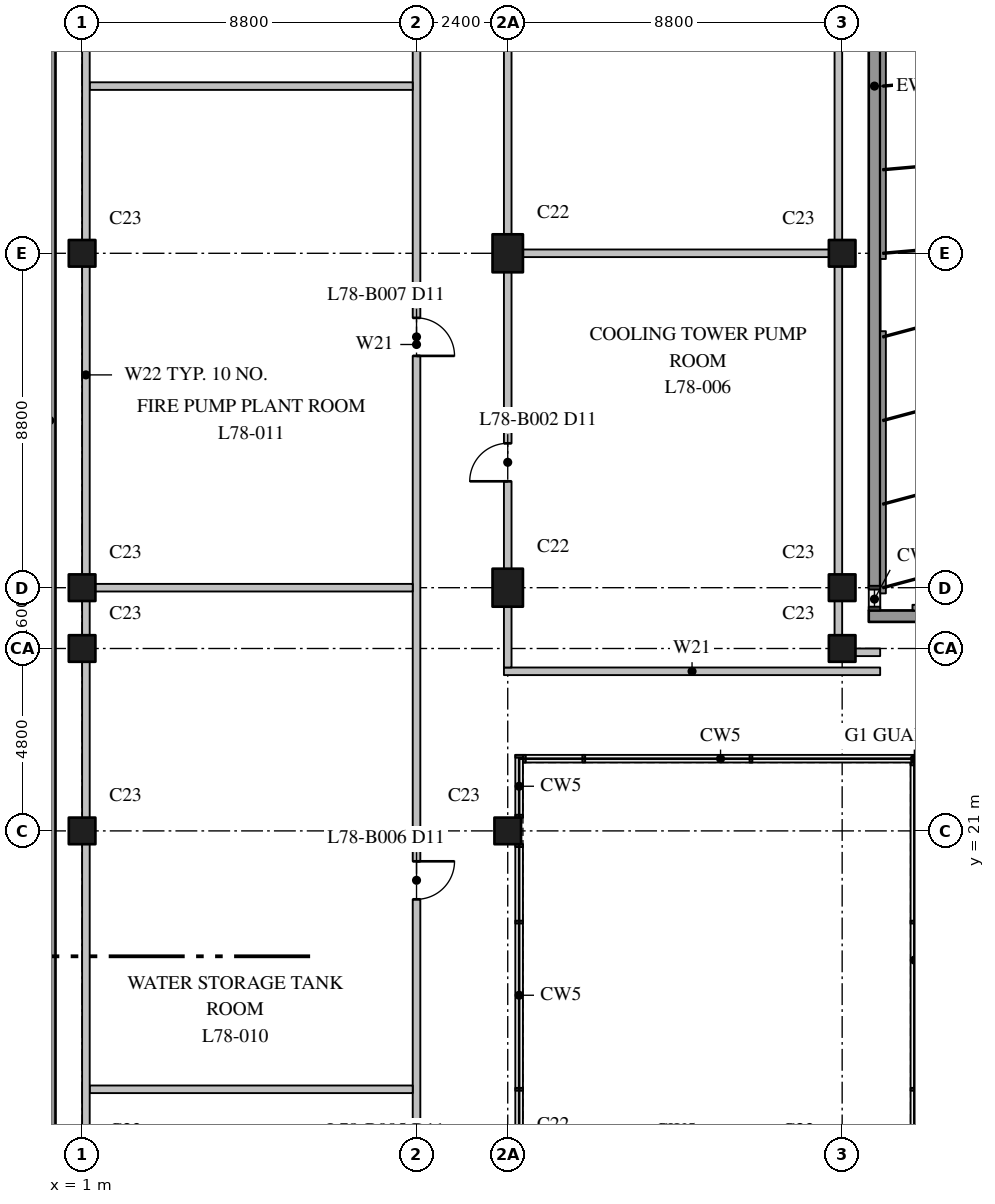
"""IFC4 building model, lengths in metres.
Left out: names, types, materials, properties, quantities, classifications, styles, units other than length and angle.
Written with IfcOpenShell. Run it as: python <this file> out.ifc"""

import sys

from ifc_helpers import new_model, si_unit, direction, frame, frame_2d, origin, origin_2d, place, context, subcontext, project, spatial, rectangle, extrude, element, fill, save


model = new_model("IFC4")
c1 = context("Model", 3, precision=1e-05, world=origin(), true_north=direction((0.0, 1.0)))
c2 = subcontext(c1, "Body", "Model", "MODEL_VIEW")
j1 = project(units=[si_unit("LENGTHUNIT", "METRE"), si_unit("PLANEANGLEUNIT", "RADIAN")], contexts=[c1])
p1 = place(None, origin())
s1 = spatial("IfcSite", under=j1, at=p1, CompositionType="ELEMENT")
p2 = place(p1, origin())
s2 = spatial("IfcBuilding", under=s1, at=p2, CompositionType="ELEMENT")
p3 = place(p2, frame((0.0, 0.0, 309.2)))
s3 = spatial("IfcBuildingStorey", under=s2, at=p3, CompositionType="ELEMENT", Elevation=309.2)
for number, where, z_axis, x_axis in (
    (1, (1.0, 21.0, 0.0), (0.0, 0.0, 1.0), (1.0, 0.0, 0.0)),
    (2, (1.0, 25.8, 0.0), (0.0, 0.0, 1.0), (1.0, 0.0, 0.0)),
    (3, (1.0, 27.4, 0.0), (0.0, 0.0, 1.0), (1.0, 0.0, 0.0)),
    (4, (1.0, 36.2, 0.0), (0.0, 0.0, 1.0), (1.0, 0.0, 0.0)),
    (5, (12.2, 21.0, 0.0), (0.0, 0.0, 1.0), (1.0, 0.0, 0.0)),
):
    element("IfcColumn", number, at=place(p3, frame(where, z_axis=z_axis, x_axis=x_axis)), inside=s3, PredefinedType="COLUMN", context=c2, shape_type="SweptSolid", body=[
        extrude(rectangle(XDim=0.7, YDim=0.7, at=origin_2d()), origin(), (0.0, 0.0, 1.0), 5.0),
    ])
for number, where, z_axis, x_axis in (
    (6, (12.2, 27.4, 0.0), (0.0, 0.0, 1.0), (0.0, 1.0, 0.0)),
    (7, (12.2, 36.2, 0.0), (0.0, 0.0, 1.0), (0.0, 1.0, 0.0)),
):
    element("IfcColumn", number, at=place(p3, frame(where, z_axis=z_axis, x_axis=x_axis)), inside=s3, PredefinedType="COLUMN", context=c2, shape_type="SweptSolid", body=[
        extrude(rectangle(XDim=1.0, YDim=0.8, at=origin_2d()), origin(), (0.0, 0.0, 1.0), 5.0),
    ])
for number, where, z_axis, x_axis in (
    (8, (21.0, 25.8, 0.0), (0.0, 0.0, 1.0), (1.0, 0.0, 0.0)),
    (9, (21.0, 27.4, 0.0), (0.0, 0.0, 1.0), (1.0, 0.0, 0.0)),
    (10, (21.0, 36.2, 0.0), (0.0, 0.0, 1.0), (1.0, 0.0, 0.0)),
):
    element("IfcColumn", number, at=place(p3, frame(where, z_axis=z_axis, x_axis=x_axis)), inside=s3, PredefinedType="COLUMN", context=c2, shape_type="SweptSolid", body=[
        extrude(rectangle(XDim=0.7, YDim=0.7, at=origin_2d()), origin(), (0.0, 0.0, 1.0), 5.0),
    ])
p4 = place(p3, frame((0.15, 53.8, 0.0), z_axis=(0.0, 0.0, 1.0), x_axis=(0.0, -1.0, 0.0)))
e11 = element("IfcWall", 11, at=p4, inside=s3, PredefinedType="STANDARD", context=c2, shape_type="SweptSolid", body=[
    extrude(rectangle(XDim=44.0, YDim=0.3, at=frame_2d((22.0, 0.0))), origin(), (0.0, 0.0, 1.0), 4.7),
])
p5 = place(p3, frame((26.5, 26.65, 0.0), z_axis=(0.0, 0.0, 1.0), x_axis=(-1.0, 0.0, 0.0)))
e12 = element("IfcWall", 12, at=p5, inside=s3, PredefinedType="STANDARD", context=c2, shape_type="SweptSolid", body=[
    extrude(rectangle(XDim=4.8, YDim=0.3, at=frame_2d((2.4, 0.0))), origin(), (0.0, 0.0, 1.0), 4.7),
])
p6 = place(p3, frame((21.85, 27.4, 0.0), z_axis=(0.0, 0.0, 1.0), x_axis=(0.0, 1.0, 0.0)))
e13 = element("IfcWall", 13, at=p6, inside=s3, PredefinedType="STANDARD", context=c2, shape_type="SweptSolid", body=[
    extrude(rectangle(XDim=26.4, YDim=0.3, at=frame_2d((13.2, 0.0))), origin(), (0.0, 0.0, 1.0), 4.7),
])
p7 = place(p3, frame((12.1, 25.2, 0.0), z_axis=(0.0, 0.0, 1.0), x_axis=(1.0, 0.0, 0.0)))
e14 = element("IfcWall", 14, at=p7, inside=s3, PredefinedType="PARTITIONING", context=c2, shape_type="SweptSolid", body=[
    extrude(rectangle(XDim=9.9, YDim=0.2, at=frame_2d((4.95, 0.0))), origin(), (0.0, 0.0, 1.0), 4.7),
])
for number, where, z_axis, x_axis in (
    (15, (12.3, 36.2, 0.0), (0.0, 0.0, 1.0), (1.0, 0.0, 0.0)),
    (16, (1.2, 14.2, 0.0), (0.0, 0.0, 1.0), (1.0, 0.0, 0.0)),
    (17, (1.2, 27.4, 0.0), (0.0, 0.0, 1.0), (1.0, 0.0, 0.0)),
    (18, (1.2, 40.6, 0.0), (0.0, 0.0, 1.0), (1.0, 0.0, 0.0)),
):
    element("IfcWall", number, at=place(p3, frame(where, z_axis=z_axis, x_axis=x_axis)), inside=s3, PredefinedType="PARTITIONING", context=c2, shape_type="SweptSolid", body=[
        extrude(rectangle(XDim=8.5, YDim=0.2, at=frame_2d((4.25, 0.0))), origin(), (0.0, 0.0, 1.0), 4.7),
    ])
p8 = place(p3, frame((20.8, 25.7, 0.0), z_axis=(0.0, 0.0, 1.0), x_axis=(1.0, 0.0, 0.0)))
e19 = element("IfcWall", 19, at=p8, inside=s3, PredefinedType="PARTITIONING", context=c2, shape_type="SweptSolid", body=[
    extrude(rectangle(XDim=1.2, YDim=0.2, at=frame_2d((0.6, 0.0))), origin(), (0.0, 0.0, 1.0), 4.7),
])
p9 = place(p3, frame((9.8, 9.8, 0.0), z_axis=(0.0, 0.0, 1.0), x_axis=(0.0, 1.0, 0.0)))
e20 = element("IfcWall", 20, at=p9, inside=s3, PredefinedType="PARTITIONING", context=c2, shape_type="SweptSolid", body=[
    extrude(rectangle(XDim=48.0, YDim=0.2, at=frame_2d((24.0, 0.0))), origin(), (0.0, 0.0, 1.0), 4.7),
])
p10 = place(p9, frame((1.7, 0.0, 0.0)))
e21 = element("IfcOpeningElement", 21, at=p10, cuts=e20, PredefinedType="OPENING", context=c2, shape_type="SweptSolid", body=[
    extrude(rectangle(XDim=1.0, YDim=2.1, at=frame_2d((0.5, 1.05))), frame((0.0, 0.11, 0.0), z_axis=(0.0, -1.0, 0.0), x_axis=(1.0, 0.0, 0.0)), (0.0, 0.0, 1.0), 0.22),
])
p11 = place(p9, frame((9.4, 0.0, 0.0)))
e22 = element("IfcOpeningElement", 22, at=p11, cuts=e20, PredefinedType="OPENING", context=c2, shape_type="SweptSolid", body=[
    extrude(rectangle(XDim=1.0, YDim=2.1, at=frame_2d((0.5, 1.05))), frame((0.0, 0.11, 0.0), z_axis=(0.0, -1.0, 0.0), x_axis=(1.0, 0.0, 0.0)), (0.0, 0.0, 1.0), 0.22),
])
p12 = place(p9, frame((23.7, 0.0, 0.0)))
e23 = element("IfcOpeningElement", 23, at=p12, cuts=e20, PredefinedType="OPENING", context=c2, shape_type="SweptSolid", body=[
    extrude(rectangle(XDim=1.0, YDim=2.1, at=frame_2d((0.5, 1.05))), frame((0.0, 0.11, 0.0), z_axis=(0.0, -1.0, 0.0), x_axis=(1.0, 0.0, 0.0)), (0.0, 0.0, 1.0), 0.22),
])
p13 = place(p9, frame((37.9, 0.0, 0.0)))
e24 = element("IfcOpeningElement", 24, at=p13, cuts=e20, PredefinedType="OPENING", context=c2, shape_type="SweptSolid", body=[
    extrude(rectangle(XDim=1.0, YDim=2.1, at=frame_2d((0.5, 1.05))), frame((0.0, 0.11, 0.0), z_axis=(0.0, -1.0, 0.0), x_axis=(1.0, 0.0, 0.0)), (0.0, 0.0, 1.0), 0.22),
])
p14 = place(p3, frame((12.2, 25.3, 0.0), z_axis=(0.0, 0.0, 1.0), x_axis=(0.0, 1.0, 0.0)))
e25 = element("IfcWall", 25, at=p14, inside=s3, PredefinedType="PARTITIONING", context=c2, shape_type="SweptSolid", body=[
    extrude(rectangle(XDim=38.0, YDim=0.2, at=frame_2d((19.0, 0.0))), origin(), (0.0, 0.0, 1.0), 4.7),
])
p15 = place(p14, frame((4.9, 0.0, 0.0)))
e26 = element("IfcOpeningElement", 26, at=p15, cuts=e25, PredefinedType="OPENING", context=c2, shape_type="SweptSolid", body=[
    extrude(rectangle(XDim=1.0, YDim=2.1, at=frame_2d((0.5, 1.05))), frame((0.0, 0.11, 0.0), z_axis=(0.0, -1.0, 0.0), x_axis=(1.0, 0.0, 0.0)), (0.0, 0.0, 1.0), 0.22),
])
p16 = place(p14, frame((20.3, 0.0, 0.0)))
e27 = element("IfcOpeningElement", 27, at=p16, cuts=e25, PredefinedType="OPENING", context=c2, shape_type="SweptSolid", body=[
    extrude(rectangle(XDim=1.0, YDim=2.1, at=frame_2d((0.5, 1.05))), frame((0.0, 0.11, 0.0), z_axis=(0.0, -1.0, 0.0), x_axis=(1.0, 0.0, 0.0)), (0.0, 0.0, 1.0), 0.22),
])
p17 = place(p14, frame((33.9, 0.0, 0.0)))
e28 = element("IfcOpeningElement", 28, at=p17, cuts=e25, PredefinedType="OPENING", context=c2, shape_type="SweptSolid", body=[
    extrude(rectangle(XDim=1.0, YDim=2.1, at=frame_2d((0.5, 1.05))), frame((0.0, 0.11, 0.0), z_axis=(0.0, -1.0, 0.0), x_axis=(1.0, 0.0, 0.0)), (0.0, 0.0, 1.0), 0.22),
])
p18 = place(p3, frame((20.9, 25.8, 0.0), z_axis=(0.0, 0.0, 1.0), x_axis=(0.0, 1.0, 0.0)))
e29 = element("IfcWall", 29, at=p18, inside=s3, PredefinedType="PARTITIONING", context=c2, shape_type="SweptSolid", body=[
    extrude(rectangle(XDim=30.145, YDim=0.2, at=frame_2d((15.073, 0.0))), origin(), (0.0, 0.0, 1.0), 4.266),
])
p19 = place(p3, frame((1.1, 10.055, 0.0), z_axis=(0.0, 0.0, 1.0), x_axis=(0.0, 1.0, 0.0)))
e30 = element("IfcWall", 30, at=p19, inside=s3, PredefinedType="PARTITIONING", context=c2, shape_type="SweptSolid", body=[
    extrude(rectangle(XDim=45.891, YDim=0.2, at=frame_2d((22.945, 0.0))), origin(), (0.0, 0.0, 1.0), 4.266),
])
p20 = place(p15, origin())
e31 = element("IfcDoor", 31, at=p20, inside=s3, OperationType="SINGLE_SWING_LEFT", PredefinedType="DOOR", context=c2, shape_type="SweptSolid", body=[
    extrude(rectangle(XDim=1.0, YDim=2.1, at=frame_2d((0.5, 1.05))), frame((0.0, 0.025, 0.0), z_axis=(0.0, -1.0, 0.0), x_axis=(1.0, 0.0, 0.0)), (0.0, 0.0, 1.0), 0.05),
])
fill(e26, e31)
p21 = place(p11, frame((1.0, 0.0, 0.0), z_axis=(0.0, 0.0, 1.0), x_axis=(-1.0, 0.0, 0.0)))
e32 = element("IfcDoor", 32, at=p21, inside=s3, OperationType="SINGLE_SWING_RIGHT", PredefinedType="DOOR", context=c2, shape_type="SweptSolid", body=[
    extrude(rectangle(XDim=1.0, YDim=2.1, at=frame_2d((0.5, 1.05))), frame((0.0, 0.025, 0.0), z_axis=(0.0, -1.0, 0.0), x_axis=(1.0, 0.0, 0.0)), (0.0, 0.0, 1.0), 0.05),
])
fill(e22, e32)
p22 = place(p12, frame((1.0, 0.0, 0.0), z_axis=(0.0, 0.0, 1.0), x_axis=(-1.0, 0.0, 0.0)))
e33 = element("IfcDoor", 33, at=p22, inside=s3, OperationType="SINGLE_SWING_LEFT", PredefinedType="DOOR", context=c2, shape_type="SweptSolid", body=[
    extrude(rectangle(XDim=1.0, YDim=2.1, at=frame_2d((0.5, 1.05))), frame((0.0, 0.025, 0.0), z_axis=(0.0, -1.0, 0.0), x_axis=(1.0, 0.0, 0.0)), (0.0, 0.0, 1.0), 0.05),
])
fill(e23, e33)
save(model, sys.argv[1])
